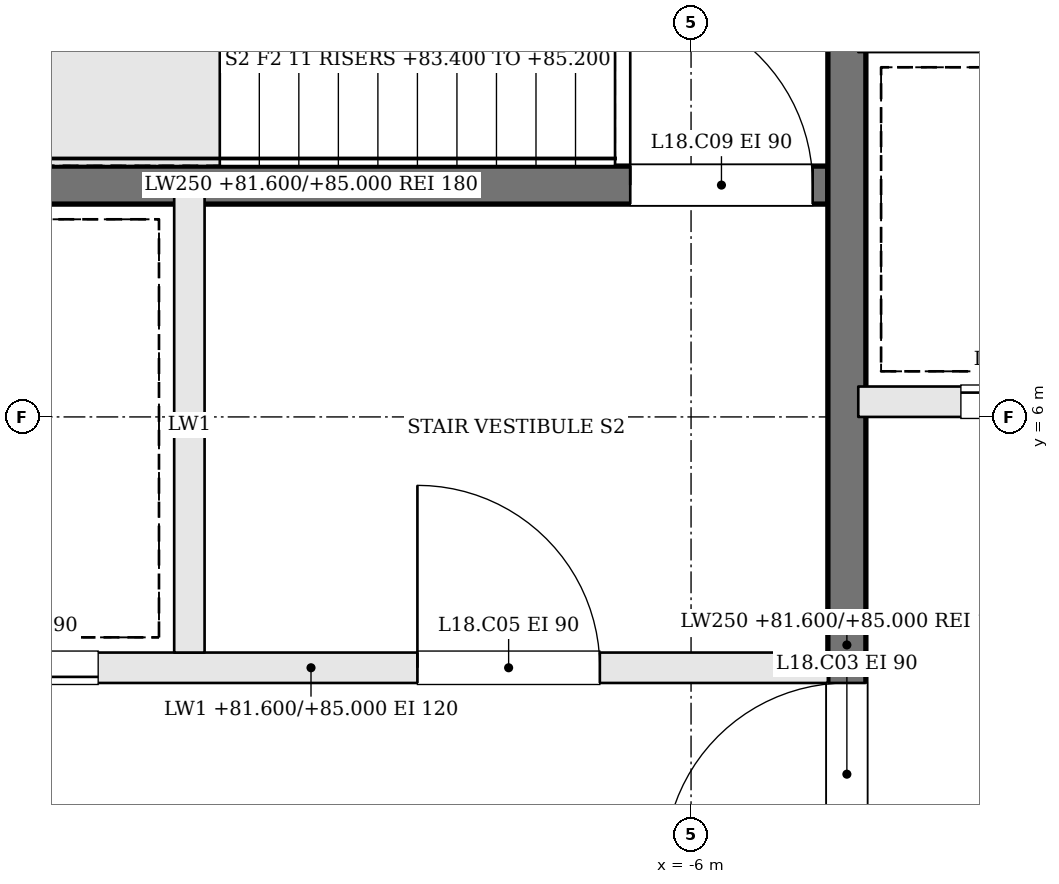
"""IFC4 building model, lengths in metres.
Left out: names, types, materials, properties, quantities, classifications, styles, units other than length and angle.
Written with IfcOpenShell. Run it as: python <this file> out.ifc"""

import sys

from ifc_helpers import new_model, si_unit, direction, frame, frame_2d, origin, place, context, subcontext, project, spatial, rectangle, extrude, element, fill, save


model = new_model("IFC4")
c1 = context("Model", 3, precision=1e-05, world=origin(), true_north=direction((0.0, 1.0)))
c2 = subcontext(c1, "Body", "Model", "MODEL_VIEW")
j1 = project(units=[si_unit("LENGTHUNIT", "METRE"), si_unit("PLANEANGLEUNIT", "RADIAN")], contexts=[c1])
p1 = place(None, origin())
s1 = spatial("IfcSite", under=j1, at=p1, CompositionType="ELEMENT")
p2 = place(p1, origin())
s2 = spatial("IfcBuilding", under=s1, at=p2, CompositionType="ELEMENT")
p3 = place(p2, frame((0.0, 0.0, 81.6)))
s3 = spatial("IfcBuildingStorey", under=s2, at=p3, CompositionType="ELEMENT", Elevation=81.6)
p4 = place(p3, frame((-11.9, 4.35, 0.0), z_axis=(0.0, 0.0, 1.0), x_axis=(1.0, 0.0, 0.0)))
e1 = element("IfcWall", 1, at=p4, inside=s3, PredefinedType="SOLIDWALL", context=c2, shape_type="SweptSolid", body=[
    extrude(rectangle(XDim=6.8, YDim=0.2, at=frame_2d((3.4, 0.0))), origin(), (0.0, 0.0, 1.0), 3.4),
])
p5 = place(p4, frame((4.1, 0.0, 0.0)))
e2 = element("IfcOpeningElement", 2, at=p5, cuts=e1, PredefinedType="OPENING", context=c2, shape_type="SweptSolid", body=[
    extrude(rectangle(XDim=1.2, YDim=2.1, at=frame_2d((0.6, 1.05))), frame((0.0, 0.11, 0.0), z_axis=(0.0, -1.0, 0.0), x_axis=(1.0, 0.0, 0.0)), (0.0, 0.0, 1.0), 0.22),
])
p6 = place(p4, frame((0.8, 0.0, 0.0)))
e3 = element("IfcOpeningElement", 3, at=p6, cuts=e1, PredefinedType="OPENING", context=c2, shape_type="SweptSolid", body=[
    extrude(rectangle(XDim=1.2, YDim=2.1, at=frame_2d((0.6, 1.05))), frame((0.0, 0.11, 0.0), z_axis=(0.0, -1.0, 0.0), x_axis=(1.0, 0.0, 0.0)), (0.0, 0.0, 1.0), 0.22),
])
p7 = place(p3, frame((-11.9, 7.525, 0.0), z_axis=(0.0, 0.0, 1.0), x_axis=(1.0, 0.0, 0.0)))
e4 = element("IfcWall", 4, at=p7, inside=s3, PredefinedType="SOLIDWALL", context=c2, shape_type="SweptSolid", body=[
    extrude(rectangle(XDim=6.8, YDim=0.25, at=frame_2d((3.4, 0.0))), origin(), (0.0, 0.0, 1.0), 3.4),
])
p8 = place(p7, frame((5.5, 0.0, 0.0)))
e5 = element("IfcOpeningElement", 5, at=p8, cuts=e4, PredefinedType="OPENING", context=c2, shape_type="SweptSolid", body=[
    extrude(rectangle(XDim=1.2, YDim=2.1, at=frame_2d((0.6, 1.05))), frame((0.0, 0.135, 0.0), z_axis=(0.0, -1.0, 0.0), x_axis=(1.0, 0.0, 0.0)), (0.0, 0.0, 1.0), 0.27),
])
p9 = place(p3, frame((-9.3, 4.45, 0.0), z_axis=(0.0, 0.0, 1.0), x_axis=(0.0, 1.0, 0.0)))
e6 = element("IfcWall", 6, at=p9, inside=s3, PredefinedType="SOLIDWALL", context=c2, shape_type="SweptSolid", body=[
    extrude(rectangle(XDim=3.0, YDim=0.2, at=frame_2d((1.5, 0.0))), origin(), (0.0, 0.0, 1.0), 3.4),
])
p10 = place(p3, frame((-4.975, -1.9, 0.0), z_axis=(0.0, 0.0, 1.0), x_axis=(0.0, 1.0, 0.0)))
e7 = element("IfcWall", 7, at=p10, inside=s3, PredefinedType="SOLIDWALL", context=c2, shape_type="SweptSolid", body=[
    extrude(rectangle(XDim=12.8, YDim=0.25, at=frame_2d((6.4, 0.0))), origin(), (0.0, 0.0, 1.0), 3.4),
])
p11 = place(p10, frame((4.95, 0.0, 0.0)))
e8 = element("IfcOpeningElement", 8, at=p11, cuts=e7, PredefinedType="OPENING", context=c2, shape_type="SweptSolid", body=[
    extrude(rectangle(XDim=1.2, YDim=2.1, at=frame_2d((0.6, 1.05))), frame((0.0, 0.135, 0.0), z_axis=(0.0, -1.0, 0.0), x_axis=(1.0, 0.0, 0.0)), (0.0, 0.0, 1.0), 0.27),
])
p12 = place(p3, frame((-4.9, 6.1, 0.0), z_axis=(0.0, 0.0, 1.0), x_axis=(1.0, 0.0, 0.0)))
e9 = element("IfcWall", 9, at=p12, inside=s3, PredefinedType="SOLIDWALL", context=c2, shape_type="SweptSolid", body=[
    extrude(rectangle(XDim=9.8, YDim=0.2, at=frame_2d((4.9, 0.0))), origin(), (0.0, 0.0, 1.0), 3.4),
])
p13 = place(p12, frame((0.675, 0.0, 0.0)))
e10 = element("IfcOpeningElement", 10, at=p13, cuts=e9, PredefinedType="OPENING", context=c2, shape_type="SweptSolid", body=[
    extrude(rectangle(XDim=1.1, YDim=2.1, at=frame_2d((0.55, 1.05))), frame((0.0, 0.11, 0.0), z_axis=(0.0, -1.0, 0.0), x_axis=(1.0, 0.0, 0.0)), (0.0, 0.0, 1.0), 0.22),
])
p14 = place(p12, frame((3.125, 0.0, 0.0)))
e11 = element("IfcOpeningElement", 11, at=p14, cuts=e9, PredefinedType="OPENING", context=c2, shape_type="SweptSolid", body=[
    extrude(rectangle(XDim=1.1, YDim=2.1, at=frame_2d((0.55, 1.05))), frame((0.0, 0.11, 0.0), z_axis=(0.0, -1.0, 0.0), x_axis=(1.0, 0.0, 0.0)), (0.0, 0.0, 1.0), 0.22),
])
p15 = place(p12, frame((5.575, 0.0, 0.0)))
e12 = element("IfcOpeningElement", 12, at=p15, cuts=e9, PredefinedType="OPENING", context=c2, shape_type="SweptSolid", body=[
    extrude(rectangle(XDim=1.1, YDim=2.1, at=frame_2d((0.55, 1.05))), frame((0.0, 0.11, 0.0), z_axis=(0.0, -1.0, 0.0), x_axis=(1.0, 0.0, 0.0)), (0.0, 0.0, 1.0), 0.22),
])
p16 = place(p12, frame((8.025, 0.0, 0.0)))
e13 = element("IfcOpeningElement", 13, at=p16, cuts=e9, PredefinedType="OPENING", context=c2, shape_type="SweptSolid", body=[
    extrude(rectangle(XDim=1.1, YDim=2.1, at=frame_2d((0.55, 1.05))), frame((0.0, 0.11, 0.0), z_axis=(0.0, -1.0, 0.0), x_axis=(1.0, 0.0, 0.0)), (0.0, 0.0, 1.0), 0.22),
])
p17 = place(p11, origin())
e14 = element("IfcDoor", 14, at=p17, inside=s3, OperationType="SINGLE_SWING_LEFT", PredefinedType="DOOR", context=c2, shape_type="SweptSolid", body=[
    extrude(rectangle(XDim=1.2, YDim=2.1, at=frame_2d((0.6, 1.05))), frame((0.0, 0.025, 0.0), z_axis=(0.0, -1.0, 0.0), x_axis=(1.0, 0.0, 0.0)), (0.0, 0.0, 1.0), 0.05),
])
fill(e8, e14)
p18 = place(p5, origin())
e15 = element("IfcDoor", 15, at=p18, inside=s3, OperationType="SINGLE_SWING_LEFT", PredefinedType="DOOR", context=c2, shape_type="SweptSolid", body=[
    extrude(rectangle(XDim=1.2, YDim=2.1, at=frame_2d((0.6, 1.05))), frame((0.0, 0.025, 0.0), z_axis=(0.0, -1.0, 0.0), x_axis=(1.0, 0.0, 0.0)), (0.0, 0.0, 1.0), 0.05),
])
fill(e2, e15)
p19 = place(p8, origin())
e16 = element("IfcDoor", 16, at=p19, inside=s3, OperationType="SINGLE_SWING_LEFT", PredefinedType="DOOR", context=c2, shape_type="SweptSolid", body=[
    extrude(rectangle(XDim=1.2, YDim=2.1, at=frame_2d((0.6, 1.05))), frame((0.0, 0.025, 0.0), z_axis=(0.0, -1.0, 0.0), x_axis=(1.0, 0.0, 0.0)), (0.0, 0.0, 1.0), 0.05),
])
fill(e5, e16)
p20 = place(p6, origin())
e17 = element("IfcDoor", 17, at=p20, inside=s3, OperationType="SLIDING_TO_RIGHT", PredefinedType="DOOR", context=c2, shape_type="SweptSolid", body=[
    extrude(rectangle(XDim=1.2, YDim=2.1, at=frame_2d((0.6, 1.05))), frame((0.0, 0.025, 0.0), z_axis=(0.0, -1.0, 0.0), x_axis=(1.0, 0.0, 0.0)), (0.0, 0.0, 1.0), 0.05),
])
fill(e3, e17)
p21 = place(p13, origin())
e18 = element("IfcDoor", 18, at=p21, inside=s3, OperationType="SLIDING_TO_RIGHT", PredefinedType="DOOR", context=c2, shape_type="SweptSolid", body=[
    extrude(rectangle(XDim=1.1, YDim=2.1, at=frame_2d((0.55, 1.05))), frame((0.0, 0.025, 0.0), z_axis=(0.0, -1.0, 0.0), x_axis=(1.0, 0.0, 0.0)), (0.0, 0.0, 1.0), 0.05),
])
fill(e10, e18)
save(model, sys.argv[1])
